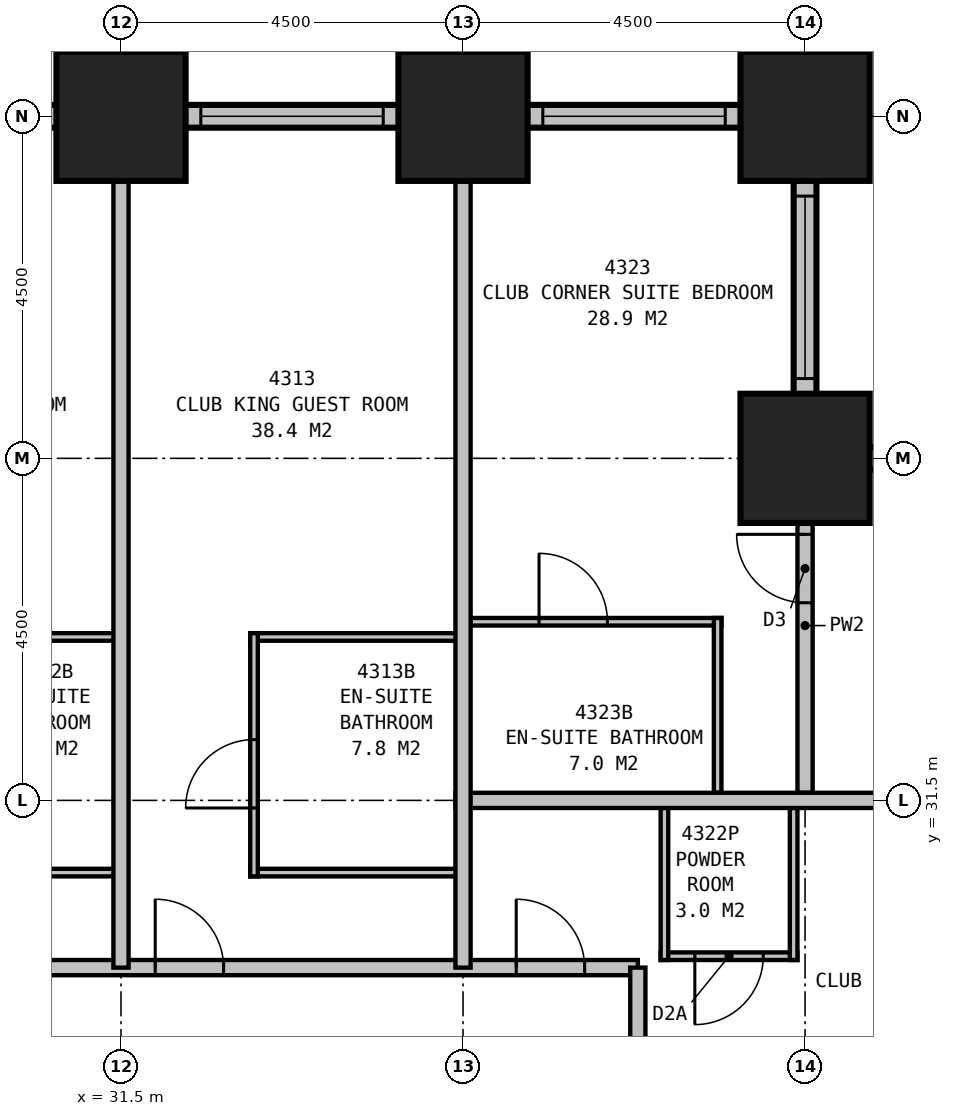
"""IFC4 building model, lengths in metres.
Left out: names, types, materials, properties, quantities, classifications, styles, units other than length and angle.
Written with IfcOpenShell. Run it as: python <this file> out.ifc"""

import sys

from ifc_helpers import new_model, si_unit, direction, frame, frame_2d, origin, origin_2d, place, context, subcontext, project, spatial, rectangle, extrude, element, fill, save


model = new_model("IFC4")
c1 = context("Model", 3, precision=1e-05, world=origin(), true_north=direction((0.0, 1.0)))
c2 = subcontext(c1, "Body", "Model", "MODEL_VIEW")
j1 = project(units=[si_unit("LENGTHUNIT", "METRE"), si_unit("PLANEANGLEUNIT", "RADIAN")], contexts=[c1])
p1 = place(None, origin())
s1 = spatial("IfcSite", under=j1, at=p1, CompositionType="ELEMENT")
p2 = place(p1, origin())
s2 = spatial("IfcBuilding", under=s1, at=p2, CompositionType="ELEMENT")
p3 = place(p2, frame((0.0, 0.0, 169.4)))
s3 = spatial("IfcBuildingStorey", under=s2, at=p3, CompositionType="ELEMENT", Elevation=169.4)
for number, where, z_axis, x_axis in (
    (1, (40.5, 36.0, 0.0), (0.0, 0.0, 1.0), (1.0, 0.0, 0.0)),
    (2, (40.5, 40.5, 0.0), (0.0, 0.0, 1.0), (1.0, 0.0, 0.0)),
    (3, (36.0, 40.5, 0.0), (0.0, 0.0, 1.0), (1.0, 0.0, 0.0)),
    (4, (31.5, 40.5, 0.0), (0.0, 0.0, 1.0), (1.0, 0.0, 0.0)),
):
    element("IfcColumn", number, at=place(p3, frame(where, z_axis=z_axis, x_axis=x_axis)), inside=s3, PredefinedType="COLUMN", context=c2, shape_type="SweptSolid", body=[
        extrude(rectangle(XDim=1.7, YDim=1.7, at=origin_2d()), origin(), (0.0, 0.0, 1.0), 3.5),
    ])
p4 = place(p3, frame((45.65, 36.0, 0.0), z_axis=(0.0, 0.0, 1.0), x_axis=(-1.0, 0.0, 0.0)))
e5 = element("IfcWall", 5, at=p4, inside=s3, PredefinedType="STANDARD", context=c2, shape_type="SweptSolid", body=[
    extrude(rectangle(XDim=5.3, YDim=0.3, at=frame_2d((2.65, 0.0))), origin(), (0.0, 0.0, 1.0), 2.25),
])
p5 = place(p4, frame((1.45, 0.0, 0.5)))
e6 = element("IfcOpeningElement", 6, at=p5, cuts=e5, PredefinedType="OPENING", context=c2, shape_type="SweptSolid", body=[
    extrude(rectangle(XDim=2.4, YDim=1.6, at=frame_2d((1.2, 0.8))), frame((0.0, 0.16, 0.0), z_axis=(0.0, -1.0, 0.0), x_axis=(1.0, 0.0, 0.0)), (0.0, 0.0, 1.0), 0.32),
])
p6 = place(p3, frame((40.5, 35.85, 0.0), z_axis=(0.0, 0.0, 1.0), x_axis=(0.0, 1.0, 0.0)))
e7 = element("IfcWall", 7, at=p6, inside=s3, PredefinedType="STANDARD", context=c2, shape_type="SweptSolid", body=[
    extrude(rectangle(XDim=4.8, YDim=0.3, at=frame_2d((2.4, 0.0))), origin(), (0.0, 0.0, 1.0), 2.25),
])
p7 = place(p6, frame((1.2, 0.0, 0.5)))
e8 = element("IfcOpeningElement", 8, at=p7, cuts=e7, PredefinedType="OPENING", context=c2, shape_type="SweptSolid", body=[
    extrude(rectangle(XDim=2.4, YDim=1.6, at=frame_2d((1.2, 0.8))), frame((0.0, 0.16, 0.0), z_axis=(0.0, -1.0, 0.0), x_axis=(1.0, 0.0, 0.0)), (0.0, 0.0, 1.0), 0.32),
])
p8 = place(p3, frame((40.65, 40.5, 0.0), z_axis=(0.0, 0.0, 1.0), x_axis=(-1.0, 0.0, 0.0)))
e9 = element("IfcWall", 9, at=p8, inside=s3, PredefinedType="STANDARD", context=c2, shape_type="SweptSolid", body=[
    extrude(rectangle(XDim=31.8, YDim=0.3, at=frame_2d((15.9, 0.0))), origin(), (0.0, 0.0, 1.0), 2.25),
])
p9 = place(p8, frame((1.2, 0.0, 0.5)))
e10 = element("IfcOpeningElement", 10, at=p9, cuts=e9, PredefinedType="OPENING", context=c2, shape_type="SweptSolid", body=[
    extrude(rectangle(XDim=2.4, YDim=1.6, at=frame_2d((1.2, 0.8))), frame((0.0, 0.16, 0.0), z_axis=(0.0, -1.0, 0.0), x_axis=(1.0, 0.0, 0.0)), (0.0, 0.0, 1.0), 0.32),
])
p10 = place(p8, frame((5.7, 0.0, 0.5)))
e11 = element("IfcOpeningElement", 11, at=p10, cuts=e9, PredefinedType="OPENING", context=c2, shape_type="SweptSolid", body=[
    extrude(rectangle(XDim=2.4, YDim=1.6, at=frame_2d((1.2, 0.8))), frame((0.0, 0.16, 0.0), z_axis=(0.0, -1.0, 0.0), x_axis=(1.0, 0.0, 0.0)), (0.0, 0.0, 1.0), 0.32),
])
p11 = place(p8, frame((10.2, 0.0, 0.5)))
e12 = element("IfcOpeningElement", 12, at=p11, cuts=e9, PredefinedType="OPENING", context=c2, shape_type="SweptSolid", body=[
    extrude(rectangle(XDim=2.4, YDim=1.6, at=frame_2d((1.2, 0.8))), frame((0.0, 0.16, 0.0), z_axis=(0.0, -1.0, 0.0), x_axis=(1.0, 0.0, 0.0)), (0.0, 0.0, 1.0), 0.32),
])
p12 = place(p8, frame((14.7, 0.0, 0.5)))
e13 = element("IfcOpeningElement", 13, at=p12, cuts=e9, PredefinedType="OPENING", context=c2, shape_type="SweptSolid", body=[
    extrude(rectangle(XDim=2.4, YDim=1.6, at=frame_2d((1.2, 0.8))), frame((0.0, 0.16, 0.0), z_axis=(0.0, -1.0, 0.0), x_axis=(1.0, 0.0, 0.0)), (0.0, 0.0, 1.0), 0.32),
])
p13 = place(p8, frame((19.2, 0.0, 0.5)))
e14 = element("IfcOpeningElement", 14, at=p13, cuts=e9, PredefinedType="OPENING", context=c2, shape_type="SweptSolid", body=[
    extrude(rectangle(XDim=2.4, YDim=1.6, at=frame_2d((1.2, 0.8))), frame((0.0, 0.16, 0.0), z_axis=(0.0, -1.0, 0.0), x_axis=(1.0, 0.0, 0.0)), (0.0, 0.0, 1.0), 0.32),
])
p14 = place(p8, frame((23.7, 0.0, 0.5)))
e15 = element("IfcOpeningElement", 15, at=p14, cuts=e9, PredefinedType="OPENING", context=c2, shape_type="SweptSolid", body=[
    extrude(rectangle(XDim=2.4, YDim=1.6, at=frame_2d((1.2, 0.8))), frame((0.0, 0.16, 0.0), z_axis=(0.0, -1.0, 0.0), x_axis=(1.0, 0.0, 0.0)), (0.0, 0.0, 1.0), 0.32),
])
p15 = place(p8, frame((28.2, 0.0, 0.5)))
e16 = element("IfcOpeningElement", 16, at=p15, cuts=e9, PredefinedType="OPENING", context=c2, shape_type="SweptSolid", body=[
    extrude(rectangle(XDim=2.4, YDim=1.6, at=frame_2d((1.2, 0.8))), frame((0.0, 0.16, 0.0), z_axis=(0.0, -1.0, 0.0), x_axis=(1.0, 0.0, 0.0)), (0.0, 0.0, 1.0), 0.32),
])
p16 = place(p3, frame((11.2, 29.3, 0.0), z_axis=(0.0, 0.0, 1.0), x_axis=(1.0, 0.0, 0.0)))
e17 = element("IfcWall", 17, at=p16, inside=s3, PredefinedType="PARTITIONING", context=c2, shape_type="SweptSolid", body=[
    extrude(rectangle(XDim=27.1, YDim=0.2, at=frame_2d((13.55, 0.0))), origin(), (0.0, 0.0, 1.0), 3.25),
])
p17 = place(p16, frame((2.75, 0.0, 0.0)))
e18 = element("IfcOpeningElement", 18, at=p17, cuts=e17, PredefinedType="OPENING", context=c2, shape_type="SweptSolid", body=[
    extrude(rectangle(XDim=0.9, YDim=2.1, at=frame_2d((0.45, 1.05))), frame((0.0, 0.11, 0.0), z_axis=(0.0, -1.0, 0.0), x_axis=(1.0, 0.0, 0.0)), (0.0, 0.0, 1.0), 0.22),
])
p18 = place(p16, frame((9.55, 0.0, 0.0)))
e19 = element("IfcOpeningElement", 19, at=p18, cuts=e17, PredefinedType="OPENING", context=c2, shape_type="SweptSolid", body=[
    extrude(rectangle(XDim=0.9, YDim=2.1, at=frame_2d((0.45, 1.05))), frame((0.0, 0.11, 0.0), z_axis=(0.0, -1.0, 0.0), x_axis=(1.0, 0.0, 0.0)), (0.0, 0.0, 1.0), 0.22),
])
p19 = place(p16, frame((16.25, 0.0, 0.0)))
e20 = element("IfcOpeningElement", 20, at=p19, cuts=e17, PredefinedType="OPENING", context=c2, shape_type="SweptSolid", body=[
    extrude(rectangle(XDim=0.9, YDim=2.1, at=frame_2d((0.45, 1.05))), frame((0.0, 0.11, 0.0), z_axis=(0.0, -1.0, 0.0), x_axis=(1.0, 0.0, 0.0)), (0.0, 0.0, 1.0), 0.22),
])
p20 = place(p16, frame((20.75, 0.0, 0.0)))
e21 = element("IfcOpeningElement", 21, at=p20, cuts=e17, PredefinedType="OPENING", context=c2, shape_type="SweptSolid", body=[
    extrude(rectangle(XDim=0.9, YDim=2.1, at=frame_2d((0.45, 1.05))), frame((0.0, 0.11, 0.0), z_axis=(0.0, -1.0, 0.0), x_axis=(1.0, 0.0, 0.0)), (0.0, 0.0, 1.0), 0.22),
])
p21 = place(p16, frame((25.5, 0.0, 0.0)))
e22 = element("IfcOpeningElement", 22, at=p21, cuts=e17, PredefinedType="OPENING", context=c2, shape_type="SweptSolid", body=[
    extrude(rectangle(XDim=0.9, YDim=2.1, at=frame_2d((0.45, 1.05))), frame((0.0, 0.11, 0.0), z_axis=(0.0, -1.0, 0.0), x_axis=(1.0, 0.0, 0.0)), (0.0, 0.0, 1.0), 0.22),
])
p22 = place(p16, frame((0.7, 0.0, 0.0)))
e23 = element("IfcOpeningElement", 23, at=p22, cuts=e17, PredefinedType="OPENING", context=c2, shape_type="SweptSolid", body=[
    extrude(rectangle(XDim=0.9, YDim=2.1, at=frame_2d((0.45, 1.05))), frame((0.0, 0.11, 0.0), z_axis=(0.0, -1.0, 0.0), x_axis=(1.0, 0.0, 0.0)), (0.0, 0.0, 1.0), 0.22),
])
p23 = place(p3, frame((38.3, 10.6, 0.0), z_axis=(0.0, 0.0, 1.0), x_axis=(0.0, 1.0, 0.0)))
e24 = element("IfcWall", 24, at=p23, inside=s3, PredefinedType="PARTITIONING", context=c2, shape_type="SweptSolid", body=[
    extrude(rectangle(XDim=18.7, YDim=0.2, at=frame_2d((9.35, 0.0))), origin(), (0.0, 0.0, 1.0), 3.25),
])
p24 = place(p23, frame((6.95, 0.0, 0.0), z_axis=(0.0, 0.0, 1.0), x_axis=(-1.0, 0.0, 0.0)))
e25 = element("IfcOpeningElement", 25, at=p24, cuts=e24, PredefinedType="OPENING", context=c2, shape_type="SweptSolid", body=[
    extrude(rectangle(XDim=0.9, YDim=2.1, at=frame_2d((0.45, 1.05))), frame((0.0, 0.11, 0.0), z_axis=(0.0, -1.0, 0.0), x_axis=(1.0, 0.0, 0.0)), (0.0, 0.0, 1.0), 0.22),
])
p25 = place(p23, frame((11.05, 0.0, 0.0), z_axis=(0.0, 0.0, 1.0), x_axis=(-1.0, 0.0, 0.0)))
e26 = element("IfcOpeningElement", 26, at=p25, cuts=e24, PredefinedType="OPENING", context=c2, shape_type="SweptSolid", body=[
    extrude(rectangle(XDim=0.9, YDim=2.1, at=frame_2d((0.45, 1.05))), frame((0.0, 0.11, 0.0), z_axis=(0.0, -1.0, 0.0), x_axis=(1.0, 0.0, 0.0)), (0.0, 0.0, 1.0), 0.22),
])
p26 = place(p3, frame((31.5, 29.3, 0.0), z_axis=(0.0, 0.0, 1.0), x_axis=(0.0, 1.0, 0.0)))
e27 = element("IfcWall", 27, at=p26, inside=s3, PredefinedType="PARTITIONING", context=c2, shape_type="SweptSolid", body=[
    extrude(rectangle(XDim=11.2, YDim=0.2, at=frame_2d((5.6, 0.0))), origin(), (0.0, 0.0, 1.0), 2.25),
])
for number, where, z_axis, x_axis in (
    (28, (28.7, 30.55, 0.0), (0.0, 0.0, 1.0), (1.0, 0.0, 0.0)),
    (29, (28.7, 33.65, 0.0), (0.0, 0.0, 1.0), (1.0, 0.0, 0.0)),
    (30, (33.2, 30.55, 0.0), (0.0, 0.0, 1.0), (1.0, 0.0, 0.0)),
    (31, (33.2, 33.65, 0.0), (0.0, 0.0, 1.0), (1.0, 0.0, 0.0)),
):
    element("IfcWall", number, at=place(p3, frame(where, z_axis=z_axis, x_axis=x_axis)), inside=s3, PredefinedType="PLUMBINGWALL", context=c2, shape_type="SweptSolid", body=[
        extrude(rectangle(XDim=2.8, YDim=0.1, at=frame_2d((1.4, 0.0))), origin(), (0.0, 0.0, 1.0), 3.25),
    ])
p27 = place(p3, frame((33.25, 30.5, 0.0), z_axis=(0.0, 0.0, 1.0), x_axis=(0.0, 1.0, 0.0)))
e32 = element("IfcWall", 32, at=p27, inside=s3, PredefinedType="PLUMBINGWALL", context=c2, shape_type="SweptSolid", body=[
    extrude(rectangle(XDim=3.2, YDim=0.1, at=frame_2d((1.6, 0.0))), origin(), (0.0, 0.0, 1.0), 3.25),
])
p28 = place(p27, frame((0.9, 0.0, 0.0)))
e33 = element("IfcOpeningElement", 33, at=p28, cuts=e32, PredefinedType="OPENING", context=c2, shape_type="SweptSolid", body=[
    extrude(rectangle(XDim=0.9, YDim=2.1, at=frame_2d((0.45, 1.05))), frame((0.0, 0.06, 0.0), z_axis=(0.0, -1.0, 0.0), x_axis=(1.0, 0.0, 0.0)), (0.0, 0.0, 1.0), 0.12),
])
p29 = place(p3, frame((36.0, 29.3, 0.0), z_axis=(0.0, 0.0, 1.0), x_axis=(0.0, 1.0, 0.0)))
e34 = element("IfcWall", 34, at=p29, inside=s3, PredefinedType="PARTITIONING", context=c2, shape_type="SweptSolid", body=[
    extrude(rectangle(XDim=11.2, YDim=0.2, at=frame_2d((5.6, 0.0))), origin(), (0.0, 0.0, 1.0), 2.25),
])
p30 = place(p3, frame((35.9, 31.5, 0.0), z_axis=(0.0, 0.0, 1.0), x_axis=(1.0, 0.0, 0.0)))
e35 = element("IfcWall", 35, at=p30, inside=s3, PredefinedType="PARTITIONING", context=c2, shape_type="SweptSolid", body=[
    extrude(rectangle(XDim=10.099, YDim=0.2, at=frame_2d((5.05, 0.0))), origin(), (0.0, 0.0, 1.0), 3.25),
])
p31 = place(p30, frame((8.099, 0.0, 0.0)))
e36 = element("IfcOpeningElement", 36, at=p31, cuts=e35, PredefinedType="OPENING", context=c2, shape_type="SweptSolid", body=[
    extrude(rectangle(XDim=0.9, YDim=2.1, at=frame_2d((0.45, 1.05))), frame((0.0, 0.11, 0.0), z_axis=(0.0, -1.0, 0.0), x_axis=(1.0, 0.0, 0.0)), (0.0, 0.0, 1.0), 0.22),
])
p32 = place(p3, frame((40.35, 31.4, 0.0), z_axis=(0.0, 0.0, 1.0), x_axis=(0.0, -1.0, 0.0)))
e37 = element("IfcWall", 37, at=p32, inside=s3, PredefinedType="PLUMBINGWALL", context=c2, shape_type="SweptSolid", body=[
    extrude(rectangle(XDim=2.0, YDim=0.1, at=frame_2d((1.0, 0.0))), origin(), (0.0, 0.0, 1.0), 2.25),
])
p33 = place(p3, frame((38.65, 31.4, 0.0), z_axis=(0.0, 0.0, 1.0), x_axis=(0.0, -1.0, 0.0)))
e38 = element("IfcWall", 38, at=p33, inside=s3, PredefinedType="PLUMBINGWALL", context=c2, shape_type="SweptSolid", body=[
    extrude(rectangle(XDim=2.0, YDim=0.1, at=frame_2d((1.0, 0.0))), origin(), (0.0, 0.0, 1.0), 3.25),
])
p34 = place(p3, frame((38.6, 29.45, 0.0), z_axis=(0.0, 0.0, 1.0), x_axis=(1.0, 0.0, 0.0)))
e39 = element("IfcWall", 39, at=p34, inside=s3, PredefinedType="PLUMBINGWALL", context=c2, shape_type="SweptSolid", body=[
    extrude(rectangle(XDim=1.8, YDim=0.1, at=frame_2d((0.9, 0.0))), origin(), (0.0, 0.0, 1.0), 3.25),
])
p35 = place(p34, frame((1.35, 0.0, 0.0), z_axis=(0.0, 0.0, 1.0), x_axis=(-1.0, 0.0, 0.0)))
e40 = element("IfcOpeningElement", 40, at=p35, cuts=e39, PredefinedType="OPENING", context=c2, shape_type="SweptSolid", body=[
    extrude(rectangle(XDim=0.9, YDim=2.1, at=frame_2d((0.45, 1.05))), frame((0.0, 0.06, 0.0), z_axis=(0.0, -1.0, 0.0), x_axis=(1.0, 0.0, 0.0)), (0.0, 0.0, 1.0), 0.12),
])
p36 = place(p3, frame((40.5, 31.6, 0.0), z_axis=(0.0, 0.0, 1.0), x_axis=(0.0, 1.0, 0.0)))
e41 = element("IfcWall", 41, at=p36, inside=s3, PredefinedType="PARTITIONING", context=c2, shape_type="SweptSolid", body=[
    extrude(rectangle(XDim=4.4, YDim=0.2, at=frame_2d((2.2, 0.0))), origin(), (0.0, 0.0, 1.0), 2.25),
])
p37 = place(p36, frame((2.5, 0.0, 0.0)))
e42 = element("IfcOpeningElement", 42, at=p37, cuts=e41, PredefinedType="OPENING", context=c2, shape_type="SweptSolid", body=[
    extrude(rectangle(XDim=0.9, YDim=2.1, at=frame_2d((0.45, 1.05))), frame((0.0, 0.11, 0.0), z_axis=(0.0, -1.0, 0.0), x_axis=(1.0, 0.0, 0.0)), (0.0, 0.0, 1.0), 0.22),
])
p38 = place(p3, frame((39.35, 31.6, 0.0), z_axis=(0.0, 0.0, 1.0), x_axis=(0.0, 1.0, 0.0)))
e43 = element("IfcWall", 43, at=p38, inside=s3, PredefinedType="PLUMBINGWALL", context=c2, shape_type="SweptSolid", body=[
    extrude(rectangle(XDim=2.3, YDim=0.1, at=frame_2d((1.15, 0.0))), origin(), (0.0, 0.0, 1.0), 3.25),
])
p39 = place(p3, frame((36.1, 33.85, 0.0), z_axis=(0.0, 0.0, 1.0), x_axis=(1.0, 0.0, 0.0)))
e44 = element("IfcWall", 44, at=p39, inside=s3, PredefinedType="PLUMBINGWALL", context=c2, shape_type="SweptSolid", body=[
    extrude(rectangle(XDim=3.3, YDim=0.1, at=frame_2d((1.65, 0.0))), origin(), (0.0, 0.0, 1.0), 3.25),
])
p40 = place(p39, frame((0.9, 0.0, 0.0)))
e45 = element("IfcOpeningElement", 45, at=p40, cuts=e44, PredefinedType="OPENING", context=c2, shape_type="SweptSolid", body=[
    extrude(rectangle(XDim=0.9, YDim=2.1, at=frame_2d((0.45, 1.05))), frame((0.0, 0.06, 0.0), z_axis=(0.0, -1.0, 0.0), x_axis=(1.0, 0.0, 0.0)), (0.0, 0.0, 1.0), 0.12),
])
p41 = place(p7, origin())
e46 = element("IfcWindow", 46, at=p41, inside=s3, PartitioningType="SINGLE_PANEL", PredefinedType="WINDOW", context=c2, shape_type="SweptSolid", body=[
    extrude(rectangle(XDim=2.4, YDim=1.6, at=frame_2d((1.2, 0.8))), frame((0.0, 0.03, 0.0), z_axis=(0.0, -1.0, 0.0), x_axis=(1.0, 0.0, 0.0)), (0.0, 0.0, 1.0), 0.06),
])
fill(e8, e46)
p42 = place(p9, origin())
e47 = element("IfcWindow", 47, at=p42, inside=s3, PartitioningType="SINGLE_PANEL", PredefinedType="WINDOW", context=c2, shape_type="SweptSolid", body=[
    extrude(rectangle(XDim=2.4, YDim=1.6, at=frame_2d((1.2, 0.8))), frame((0.0, 0.03, 0.0), z_axis=(0.0, -1.0, 0.0), x_axis=(1.0, 0.0, 0.0)), (0.0, 0.0, 1.0), 0.06),
])
fill(e10, e47)
p43 = place(p10, origin())
e48 = element("IfcWindow", 48, at=p43, inside=s3, PartitioningType="SINGLE_PANEL", PredefinedType="WINDOW", context=c2, shape_type="SweptSolid", body=[
    extrude(rectangle(XDim=2.4, YDim=1.6, at=frame_2d((1.2, 0.8))), frame((0.0, 0.03, 0.0), z_axis=(0.0, -1.0, 0.0), x_axis=(1.0, 0.0, 0.0)), (0.0, 0.0, 1.0), 0.06),
])
fill(e11, e48)
p44 = place(p20, origin())
e49 = element("IfcDoor", 49, at=p44, inside=s3, OperationType="SINGLE_SWING_LEFT", PredefinedType="DOOR", context=c2, shape_type="SweptSolid", body=[
    extrude(rectangle(XDim=0.9, YDim=2.1, at=frame_2d((0.45, 1.05))), frame((0.0, 0.025, 0.0), z_axis=(0.0, -1.0, 0.0), x_axis=(1.0, 0.0, 0.0)), (0.0, 0.0, 1.0), 0.05),
])
fill(e21, e49)
p45 = place(p21, origin())
e50 = element("IfcDoor", 50, at=p45, inside=s3, OperationType="SINGLE_SWING_LEFT", PredefinedType="DOOR", context=c2, shape_type="SweptSolid", body=[
    extrude(rectangle(XDim=0.9, YDim=2.1, at=frame_2d((0.45, 1.05))), frame((0.0, 0.025, 0.0), z_axis=(0.0, -1.0, 0.0), x_axis=(1.0, 0.0, 0.0)), (0.0, 0.0, 1.0), 0.05),
])
fill(e22, e50)
p46 = place(p28, origin())
e51 = element("IfcDoor", 51, at=p46, inside=s3, OperationType="SINGLE_SWING_LEFT", PredefinedType="DOOR", context=c2, shape_type="SweptSolid", body=[
    extrude(rectangle(XDim=0.9, YDim=2.1, at=frame_2d((0.45, 1.05))), frame((0.0, 0.025, 0.0), z_axis=(0.0, -1.0, 0.0), x_axis=(1.0, 0.0, 0.0)), (0.0, 0.0, 1.0), 0.05),
])
fill(e33, e51)
p47 = place(p35, origin())
e52 = element("IfcDoor", 52, at=p47, inside=s3, OperationType="SINGLE_SWING_RIGHT", PredefinedType="DOOR", context=c2, shape_type="SweptSolid", body=[
    extrude(rectangle(XDim=0.9, YDim=2.1, at=frame_2d((0.45, 1.05))), frame((0.0, 0.025, 0.0), z_axis=(0.0, -1.0, 0.0), x_axis=(1.0, 0.0, 0.0)), (0.0, 0.0, 1.0), 0.05),
])
fill(e40, e52)
p48 = place(p37, origin())
e53 = element("IfcDoor", 53, at=p48, inside=s3, OperationType="SINGLE_SWING_RIGHT", PredefinedType="DOOR", context=c2, shape_type="SweptSolid", body=[
    extrude(rectangle(XDim=0.9, YDim=2.1, at=frame_2d((0.45, 1.05))), frame((0.0, 0.025, 0.0), z_axis=(0.0, -1.0, 0.0), x_axis=(1.0, 0.0, 0.0)), (0.0, 0.0, 1.0), 0.05),
])
fill(e42, e53)
p49 = place(p40, origin())
e54 = element("IfcDoor", 54, at=p49, inside=s3, OperationType="SINGLE_SWING_LEFT", PredefinedType="DOOR", context=c2, shape_type="SweptSolid", body=[
    extrude(rectangle(XDim=0.9, YDim=2.1, at=frame_2d((0.45, 1.05))), frame((0.0, 0.025, 0.0), z_axis=(0.0, -1.0, 0.0), x_axis=(1.0, 0.0, 0.0)), (0.0, 0.0, 1.0), 0.05),
])
fill(e45, e54)
save(model, sys.argv[1])
